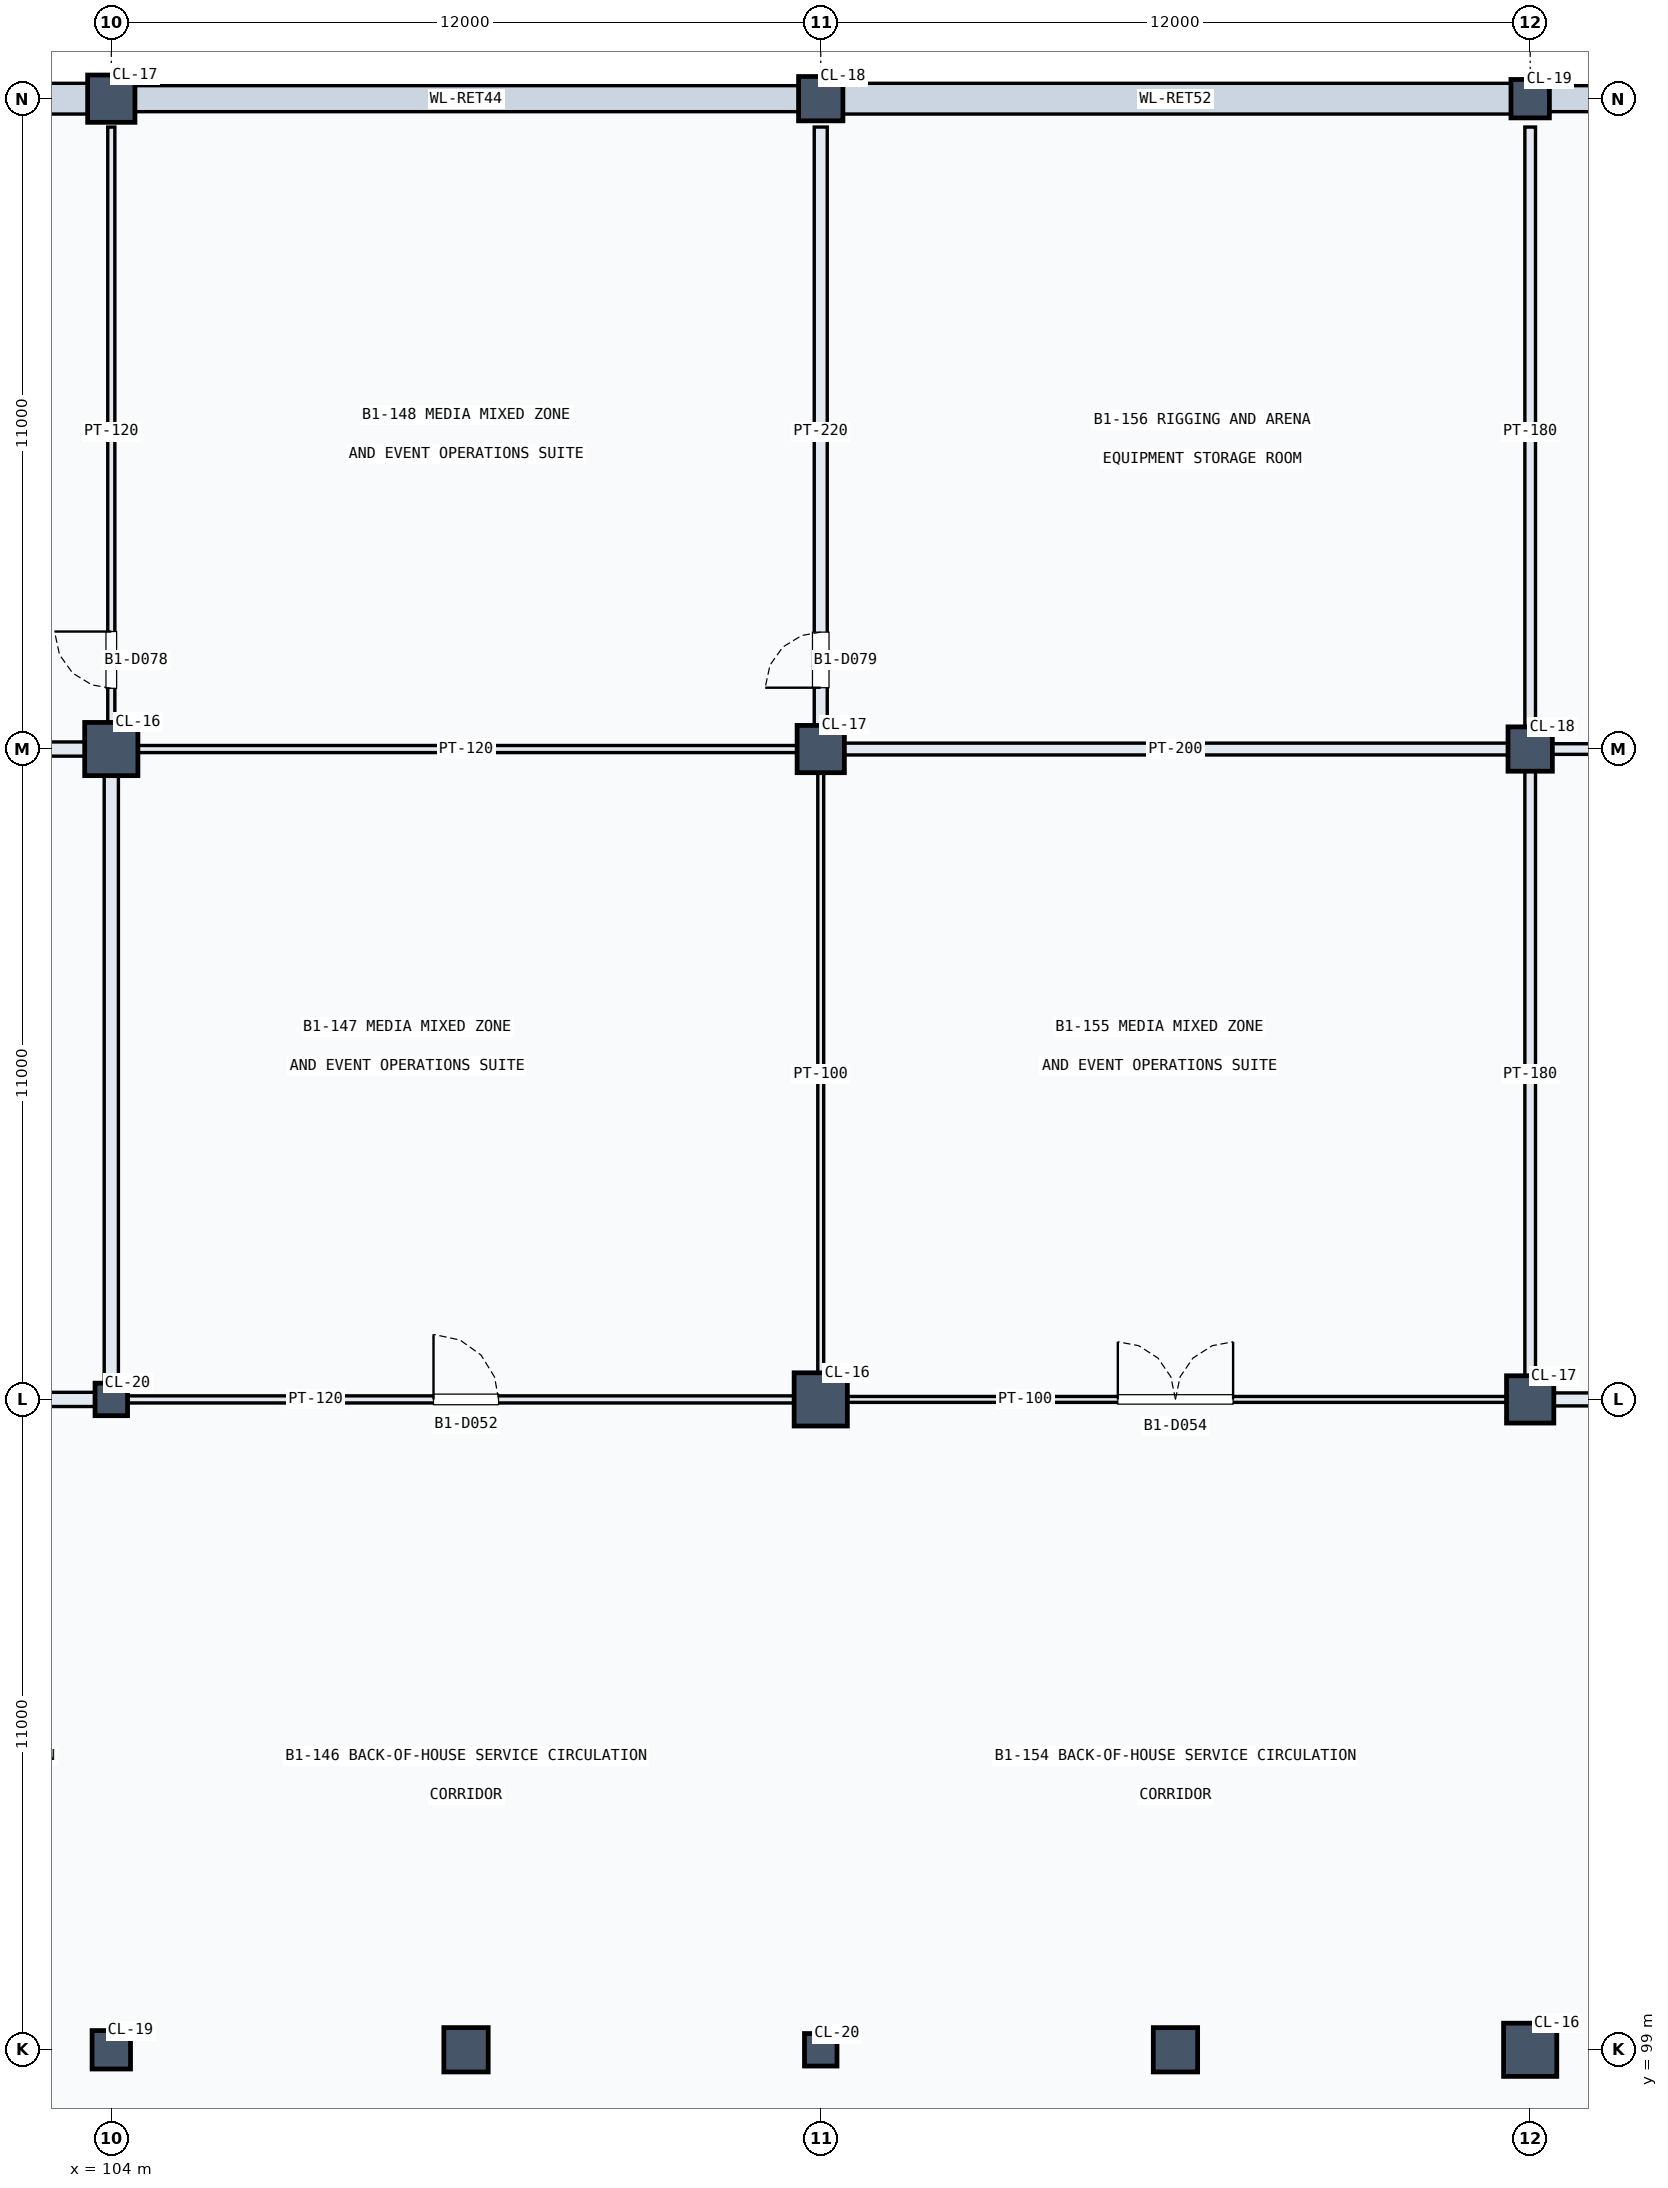
"""IFC4 building model, lengths in metres.
Left out: names, types, materials, properties, quantities, classifications, styles, units other than length and angle.
Written with IfcOpenShell. Run it as: python <this file> out.ifc"""

import sys

from ifc_helpers import new_model, si_unit, direction, frame, frame_2d, origin, origin_2d, place, context, subcontext, project, spatial, rectangle, circle, extrude, element, fill, save


model = new_model("IFC4")
c1 = context("Model", 3, precision=1e-05, world=origin(), true_north=direction((0.0, 1.0)))
c2 = subcontext(c1, "Body", "Model", "MODEL_VIEW")
j1 = project(units=[si_unit("LENGTHUNIT", "METRE"), si_unit("PLANEANGLEUNIT", "RADIAN")], contexts=[c1])
p1 = place(None, origin())
s1 = spatial("IfcSite", under=j1, at=p1, CompositionType="ELEMENT")
p2 = place(p1, origin())
s2 = spatial("IfcBuilding", under=s1, at=p2, CompositionType="ELEMENT")
p3 = place(p2, frame((0.0, 0.0, -5.4)))
s3 = spatial("IfcBuildingStorey", under=s2, at=p3, CompositionType="ELEMENT", Elevation=-5.4)
p4 = place(p3, frame((104.0, 99.0, 0.0), z_axis=(0.0, 0.0, 1.0), x_axis=(1.0, 0.0, 0.0)))
e1 = element("IfcColumn", 1, at=p4, inside=s3, PredefinedType="COLUMN", context=c2, shape_type="SweptSolid", body=[
    extrude(circle(Radius=0.325, at=origin_2d()), origin(), (0.0, 0.0, 1.0), 5.4),
])
p5 = place(p3, frame((104.0, 110.0, 0.0), z_axis=(0.0, 0.0, 1.0), x_axis=(1.0, 0.0, 0.0)))
e2 = element("IfcColumn", 2, at=p5, inside=s3, PredefinedType="COLUMN", context=c2, shape_type="SweptSolid", body=[
    extrude(circle(Radius=0.275, at=origin_2d()), origin(), (0.0, 0.0, 1.0), 5.4),
])
p6 = place(p3, frame((104.0, 121.0, 0.0), z_axis=(0.0, 0.0, 1.0), x_axis=(1.0, 0.0, 0.0)))
e3 = element("IfcColumn", 3, at=p6, inside=s3, PredefinedType="COLUMN", context=c2, shape_type="SweptSolid", body=[
    extrude(circle(Radius=0.45, at=origin_2d()), origin(), (0.0, 0.0, 1.0), 5.4),
])
p7 = place(p3, frame((104.0, 132.0, 0.0), z_axis=(0.0, 0.0, 1.0), x_axis=(1.0, 0.0, 0.0)))
e4 = element("IfcColumn", 4, at=p7, inside=s3, PredefinedType="COLUMN", context=c2, shape_type="SweptSolid", body=[
    extrude(circle(Radius=0.4, at=origin_2d()), origin(), (0.0, 0.0, 1.0), 5.4),
])
p8 = place(p3, frame((116.0, 99.0, 0.0), z_axis=(0.0, 0.0, 1.0), x_axis=(1.0, 0.0, 0.0)))
e5 = element("IfcColumn", 5, at=p8, inside=s3, PredefinedType="COLUMN", context=c2, shape_type="SweptSolid", body=[
    extrude(circle(Radius=0.275, at=origin_2d()), origin(), (0.0, 0.0, 1.0), 5.4),
])
p9 = place(p3, frame((116.0, 110.0, 0.0), z_axis=(0.0, 0.0, 1.0), x_axis=(1.0, 0.0, 0.0)))
e6 = element("IfcColumn", 6, at=p9, inside=s3, PredefinedType="COLUMN", context=c2, shape_type="SweptSolid", body=[
    extrude(circle(Radius=0.45, at=origin_2d()), origin(), (0.0, 0.0, 1.0), 5.4),
])
p10 = place(p3, frame((116.0, 121.0, 0.0), z_axis=(0.0, 0.0, 1.0), x_axis=(1.0, 0.0, 0.0)))
e7 = element("IfcColumn", 7, at=p10, inside=s3, PredefinedType="COLUMN", context=c2, shape_type="SweptSolid", body=[
    extrude(circle(Radius=0.4, at=origin_2d()), origin(), (0.0, 0.0, 1.0), 5.4),
])
p11 = place(p3, frame((116.0, 132.0, 0.0), z_axis=(0.0, 0.0, 1.0), x_axis=(1.0, 0.0, 0.0)))
e8 = element("IfcColumn", 8, at=p11, inside=s3, PredefinedType="COLUMN", context=c2, shape_type="SweptSolid", body=[
    extrude(circle(Radius=0.375, at=origin_2d()), origin(), (0.0, 0.0, 1.0), 5.4),
])
p12 = place(p3, frame((128.0, 99.0, 0.0), z_axis=(0.0, 0.0, 1.0), x_axis=(1.0, 0.0, 0.0)))
e9 = element("IfcColumn", 9, at=p12, inside=s3, PredefinedType="COLUMN", context=c2, shape_type="SweptSolid", body=[
    extrude(circle(Radius=0.45, at=origin_2d()), origin(), (0.0, 0.0, 1.0), 5.4),
])
p13 = place(p3, frame((128.0, 110.0, 0.0), z_axis=(0.0, 0.0, 1.0), x_axis=(1.0, 0.0, 0.0)))
e10 = element("IfcColumn", 10, at=p13, inside=s3, PredefinedType="COLUMN", context=c2, shape_type="SweptSolid", body=[
    extrude(circle(Radius=0.4, at=origin_2d()), origin(), (0.0, 0.0, 1.0), 5.4),
])
p14 = place(p3, frame((128.0, 121.0, 0.0), z_axis=(0.0, 0.0, 1.0), x_axis=(1.0, 0.0, 0.0)))
e11 = element("IfcColumn", 11, at=p14, inside=s3, PredefinedType="COLUMN", context=c2, shape_type="SweptSolid", body=[
    extrude(circle(Radius=0.375, at=origin_2d()), origin(), (0.0, 0.0, 1.0), 5.4),
])
p15 = place(p3, frame((128.0, 132.0, 0.0), z_axis=(0.0, 0.0, 1.0), x_axis=(1.0, 0.0, 0.0)))
e12 = element("IfcColumn", 12, at=p15, inside=s3, PredefinedType="COLUMN", context=c2, shape_type="SweptSolid", body=[
    extrude(circle(Radius=0.325, at=origin_2d()), origin(), (0.0, 0.0, 1.0), 5.4),
])
for number, where, z_axis, x_axis in (
    (13, (110.0, 99.0, 0.0), (0.0, 0.0, 1.0), (1.0, 0.0, 0.0)),
    (14, (122.0, 99.0, 0.0), (0.0, 0.0, 1.0), (1.0, 0.0, 0.0)),
):
    element("IfcColumn", number, at=place(p3, frame(where, z_axis=z_axis, x_axis=x_axis)), inside=s3, PredefinedType="COLUMN", context=c2, shape_type="SweptSolid", body=[
        extrude(circle(Radius=0.375, at=origin_2d()), origin(), (0.0, 0.0, 1.0), 5.4),
    ])
p16 = place(p3, frame((94.22, 132.0, 0.0), z_axis=(0.0, 0.0, 1.0), x_axis=(1.0, 0.0, 0.0)))
e15 = element("IfcWall", 15, at=p16, inside=s3, PredefinedType="SOLIDWALL", context=c2, shape_type="SweptSolid", body=[
    extrude(rectangle(XDim=9.56, YDim=0.52, at=frame_2d((4.78, 0.0))), origin(), (0.0, 0.0, 1.0), 4.23),
])
p17 = place(p3, frame((104.22, 132.0, 0.0), z_axis=(0.0, 0.0, 1.0), x_axis=(1.0, 0.0, 0.0)))
e16 = element("IfcWall", 16, at=p17, inside=s3, PredefinedType="SOLIDWALL", context=c2, shape_type="SweptSolid", body=[
    extrude(rectangle(XDim=11.56, YDim=0.44, at=frame_2d((5.78, 0.0))), origin(), (0.0, 0.0, 1.0), 4.23),
])
p18 = place(p3, frame((116.22, 132.0, 0.0), z_axis=(0.0, 0.0, 1.0), x_axis=(1.0, 0.0, 0.0)))
e17 = element("IfcWall", 17, at=p18, inside=s3, PredefinedType="SOLIDWALL", context=c2, shape_type="SweptSolid", body=[
    extrude(rectangle(XDim=11.56, YDim=0.52, at=frame_2d((5.78, 0.0))), origin(), (0.0, 0.0, 1.0), 4.418),
])
p19 = place(p3, frame((128.22, 132.0, 0.0), z_axis=(0.0, 0.0, 1.0), x_axis=(1.0, 0.0, 0.0)))
e18 = element("IfcWall", 18, at=p19, inside=s3, PredefinedType="SOLIDWALL", context=c2, shape_type="SweptSolid", body=[
    extrude(rectangle(XDim=11.56, YDim=0.44, at=frame_2d((5.78, 0.0))), origin(), (0.0, 0.0, 1.0), 4.418),
])
p20 = place(p3, frame((94.22, 110.0, 0.0), z_axis=(0.0, 0.0, 1.0), x_axis=(1.0, 0.0, 0.0)))
e19 = element("IfcWall", 19, at=p20, inside=s3, PredefinedType="PARTITIONING", context=c2, shape_type="SweptSolid", body=[
    extrude(rectangle(XDim=9.56, YDim=0.24, at=frame_2d((4.78, 0.0))), origin(), (0.0, 0.0, 1.0), 4.08),
])
p21 = place(p20, frame((4.07, 0.0, 0.0)))
e20 = element("IfcOpeningElement", 20, at=p21, cuts=e19, PredefinedType="OPENING", context=c2, shape_type="SweptSolid", body=[
    extrude(rectangle(XDim=1.42, YDim=2.25, at=frame_2d((0.71, 1.125))), frame((0.0, 0.13, 0.0), z_axis=(0.0, -1.0, 0.0), x_axis=(1.0, 0.0, 0.0)), (0.0, 0.0, 1.0), 0.26),
])
p22 = place(p3, frame((104.22, 110.0, 0.0), z_axis=(0.0, 0.0, 1.0), x_axis=(1.0, 0.0, 0.0)))
e21 = element("IfcWall", 21, at=p22, inside=s3, PredefinedType="PARTITIONING", context=c2, shape_type="SweptSolid", body=[
    extrude(rectangle(XDim=11.56, YDim=0.12, at=frame_2d((5.78, 0.0))), origin(), (0.0, 0.0, 1.0), 4.08),
])
p23 = place(p22, frame((5.23, 0.0, 0.0)))
e22 = element("IfcOpeningElement", 22, at=p23, cuts=e21, PredefinedType="OPENING", context=c2, shape_type="SweptSolid", body=[
    extrude(rectangle(XDim=1.1, YDim=2.1, at=frame_2d((0.55, 1.05))), frame((0.0, 0.07, 0.0), z_axis=(0.0, -1.0, 0.0), x_axis=(1.0, 0.0, 0.0)), (0.0, 0.0, 1.0), 0.14),
])
p24 = place(p3, frame((116.22, 110.0, 0.0), z_axis=(0.0, 0.0, 1.0), x_axis=(1.0, 0.0, 0.0)))
e23 = element("IfcWall", 23, at=p24, inside=s3, PredefinedType="PARTITIONING", context=c2, shape_type="SweptSolid", body=[
    extrude(rectangle(XDim=11.56, YDim=0.1, at=frame_2d((5.78, 0.0))), origin(), (0.0, 0.0, 1.0), 4.28),
])
p25 = place(p24, frame((4.805, 0.0, 0.0)))
e24 = element("IfcOpeningElement", 24, at=p25, cuts=e23, PredefinedType="OPENING", context=c2, shape_type="SweptSolid", body=[
    extrude(rectangle(XDim=1.95, YDim=2.4, at=frame_2d((0.975, 1.2))), frame((0.0, 0.06, 0.0), z_axis=(0.0, -1.0, 0.0), x_axis=(1.0, 0.0, 0.0)), (0.0, 0.0, 1.0), 0.12),
])
p26 = place(p3, frame((128.22, 110.0, 0.0), z_axis=(0.0, 0.0, 1.0), x_axis=(1.0, 0.0, 0.0)))
e25 = element("IfcWall", 25, at=p26, inside=s3, PredefinedType="PARTITIONING", context=c2, shape_type="SweptSolid", body=[
    extrude(rectangle(XDim=11.56, YDim=0.22, at=frame_2d((5.78, 0.0))), origin(), (0.0, 0.0, 1.0), 4.346),
])
p27 = place(p26, frame((5.27, 0.0, 0.0)))
e26 = element("IfcOpeningElement", 26, at=p27, cuts=e25, PredefinedType="OPENING", context=c2, shape_type="SweptSolid", body=[
    extrude(rectangle(XDim=1.02, YDim=2.25, at=frame_2d((0.51, 1.125))), frame((0.0, 0.12, 0.0), z_axis=(0.0, -1.0, 0.0), x_axis=(1.0, 0.0, 0.0)), (0.0, 0.0, 1.0), 0.24),
])
p28 = place(p3, frame((94.22, 121.0, 0.0), z_axis=(0.0, 0.0, 1.0), x_axis=(1.0, 0.0, 0.0)))
e27 = element("IfcWall", 27, at=p28, inside=s3, PredefinedType="PARTITIONING", context=c2, shape_type="SweptSolid", body=[
    extrude(rectangle(XDim=9.56, YDim=0.24, at=frame_2d((4.78, 0.0))), origin(), (0.0, 0.0, 1.0), 4.08),
])
p29 = place(p3, frame((104.0, 110.22, 0.0), z_axis=(0.0, 0.0, 1.0), x_axis=(0.0, 1.0, 0.0)))
e28 = element("IfcWall", 28, at=p29, inside=s3, PredefinedType="PARTITIONING", context=c2, shape_type="SweptSolid", body=[
    extrude(rectangle(XDim=10.56, YDim=0.24, at=frame_2d((5.28, 0.0))), origin(), (0.0, 0.0, 1.0), 4.08),
])
p30 = place(p3, frame((104.0, 121.22, 0.0), z_axis=(0.0, 0.0, 1.0), x_axis=(0.0, 1.0, 0.0)))
e29 = element("IfcWall", 29, at=p30, inside=s3, PredefinedType="PARTITIONING", context=c2, shape_type="SweptSolid", body=[
    extrude(rectangle(XDim=10.3, YDim=0.12, at=frame_2d((5.15, 0.0))), origin(), (0.0, 0.0, 1.0), 4.08),
])
p31 = place(p30, frame((0.808, 0.0, 0.0)))
e30 = element("IfcOpeningElement", 30, at=p31, cuts=e29, PredefinedType="OPENING", context=c2, shape_type="SweptSolid", body=[
    extrude(rectangle(XDim=0.96, YDim=2.15, at=frame_2d((0.48, 1.075))), frame((0.0, 0.07, 0.0), z_axis=(0.0, -1.0, 0.0), x_axis=(1.0, 0.0, 0.0)), (0.0, 0.0, 1.0), 0.14),
])
p32 = place(p3, frame((104.22, 121.0, 0.0), z_axis=(0.0, 0.0, 1.0), x_axis=(1.0, 0.0, 0.0)))
e31 = element("IfcWall", 31, at=p32, inside=s3, PredefinedType="PARTITIONING", context=c2, shape_type="SweptSolid", body=[
    extrude(rectangle(XDim=11.56, YDim=0.12, at=frame_2d((5.78, 0.0))), origin(), (0.0, 0.0, 1.0), 4.08),
])
p33 = place(p3, frame((116.0, 110.22, 0.0), z_axis=(0.0, 0.0, 1.0), x_axis=(0.0, 1.0, 0.0)))
e32 = element("IfcWall", 32, at=p33, inside=s3, PredefinedType="PARTITIONING", context=c2, shape_type="SweptSolid", body=[
    extrude(rectangle(XDim=10.56, YDim=0.1, at=frame_2d((5.28, 0.0))), origin(), (0.0, 0.0, 1.0), 4.28),
])
p34 = place(p3, frame((116.0, 121.22, 0.0), z_axis=(0.0, 0.0, 1.0), x_axis=(0.0, 1.0, 0.0)))
e33 = element("IfcWall", 33, at=p34, inside=s3, PredefinedType="PARTITIONING", context=c2, shape_type="SweptSolid", body=[
    extrude(rectangle(XDim=10.3, YDim=0.22, at=frame_2d((5.15, 0.0))), origin(), (0.0, 0.0, 1.0), 4.33),
])
p35 = place(p34, frame((0.817, 0.0, 0.0)))
e34 = element("IfcOpeningElement", 34, at=p35, cuts=e33, PredefinedType="OPENING", context=c2, shape_type="SweptSolid", body=[
    extrude(rectangle(XDim=0.94, YDim=2.15, at=frame_2d((0.47, 1.075))), frame((0.0, 0.12, 0.0), z_axis=(0.0, -1.0, 0.0), x_axis=(1.0, 0.0, 0.0)), (0.0, 0.0, 1.0), 0.24),
])
p36 = place(p3, frame((116.22, 121.0, 0.0), z_axis=(0.0, 0.0, 1.0), x_axis=(1.0, 0.0, 0.0)))
e35 = element("IfcWall", 35, at=p36, inside=s3, PredefinedType="PARTITIONING", context=c2, shape_type="SweptSolid", body=[
    extrude(rectangle(XDim=11.56, YDim=0.2, at=frame_2d((5.78, 0.0))), origin(), (0.0, 0.0, 1.0), 4.33),
])
p37 = place(p3, frame((128.0, 110.22, 0.0), z_axis=(0.0, 0.0, 1.0), x_axis=(0.0, 1.0, 0.0)))
e36 = element("IfcWall", 36, at=p37, inside=s3, PredefinedType="PARTITIONING", context=c2, shape_type="SweptSolid", body=[
    extrude(rectangle(XDim=10.56, YDim=0.18, at=frame_2d((5.28, 0.0))), origin(), (0.0, 0.0, 1.0), 4.346),
])
p38 = place(p3, frame((128.0, 121.22, 0.0), z_axis=(0.0, 0.0, 1.0), x_axis=(0.0, 1.0, 0.0)))
e37 = element("IfcWall", 37, at=p38, inside=s3, PredefinedType="PARTITIONING", context=c2, shape_type="SweptSolid", body=[
    extrude(rectangle(XDim=10.3, YDim=0.18, at=frame_2d((5.15, 0.0))), origin(), (0.0, 0.0, 1.0), 4.41),
])
p39 = place(p3, frame((128.22, 121.0, 0.0), z_axis=(0.0, 0.0, 1.0), x_axis=(1.0, 0.0, 0.0)))
e38 = element("IfcWall", 38, at=p39, inside=s3, PredefinedType="PARTITIONING", context=c2, shape_type="SweptSolid", body=[
    extrude(rectangle(XDim=11.56, YDim=0.18, at=frame_2d((5.78, 0.0))), origin(), (0.0, 0.0, 1.0), 4.41),
])
p40 = place(p23, origin())
e39 = element("IfcDoor", 39, at=p40, inside=s3, OperationType="SINGLE_SWING_LEFT", PredefinedType="DOOR", context=c2, shape_type="SweptSolid", body=[
    extrude(rectangle(XDim=1.1, YDim=2.1, at=frame_2d((0.55, 1.05))), frame((0.0, 0.025, 0.0), z_axis=(0.0, -1.0, 0.0), x_axis=(1.0, 0.0, 0.0)), (0.0, 0.0, 1.0), 0.05),
])
fill(e22, e39)
p41 = place(p25, origin())
e40 = element("IfcDoor", 40, at=p41, inside=s3, OperationType="DOUBLE_DOOR_SINGLE_SWING", PredefinedType="DOOR", context=c2, shape_type="SweptSolid", body=[
    extrude(rectangle(XDim=1.95, YDim=2.4, at=frame_2d((0.975, 1.2))), frame((0.0, 0.025, 0.0), z_axis=(0.0, -1.0, 0.0), x_axis=(1.0, 0.0, 0.0)), (0.0, 0.0, 1.0), 0.05),
])
fill(e24, e40)
p42 = place(p31, origin())
e41 = element("IfcDoor", 41, at=p42, inside=s3, OperationType="SINGLE_SWING_RIGHT", PredefinedType="DOOR", context=c2, shape_type="SweptSolid", body=[
    extrude(rectangle(XDim=0.96, YDim=2.15, at=frame_2d((0.48, 1.075))), frame((0.0, 0.025, 0.0), z_axis=(0.0, -1.0, 0.0), x_axis=(1.0, 0.0, 0.0)), (0.0, 0.0, 1.0), 0.05),
])
fill(e30, e41)
p43 = place(p35, origin())
e42 = element("IfcDoor", 42, at=p43, inside=s3, OperationType="SINGLE_SWING_LEFT", PredefinedType="DOOR", context=c2, shape_type="SweptSolid", body=[
    extrude(rectangle(XDim=0.94, YDim=2.15, at=frame_2d((0.47, 1.075))), frame((0.0, 0.025, 0.0), z_axis=(0.0, -1.0, 0.0), x_axis=(1.0, 0.0, 0.0)), (0.0, 0.0, 1.0), 0.05),
])
fill(e34, e42)
save(model, sys.argv[1])
